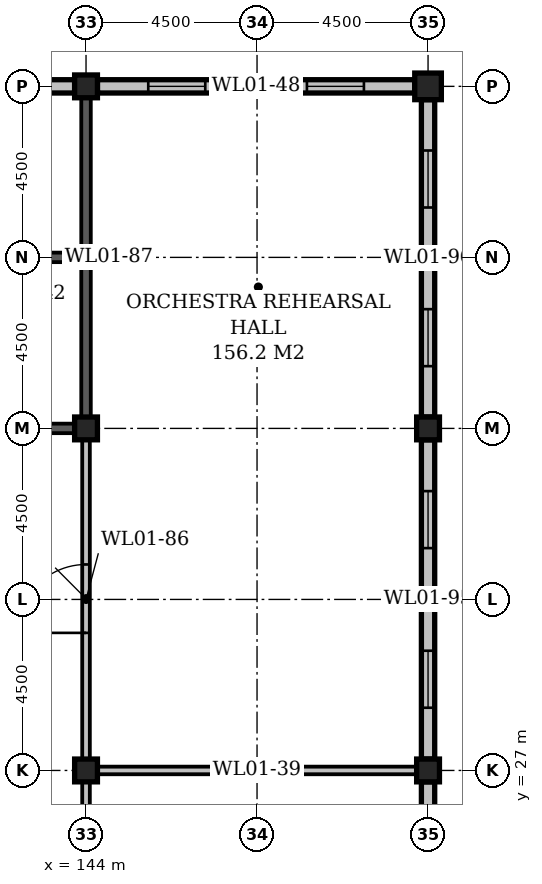
"""IFC4 building model, lengths in metres.
Left out: names, types, materials, properties, quantities, classifications, styles, units other than length and angle.
Written with IfcOpenShell. Run it as: python <this file> out.ifc"""

import sys

from ifc_helpers import new_model, si_unit, direction, frame, frame_2d, origin, origin_2d, place, context, subcontext, project, spatial, rectangle, extrude, element, fill, save


model = new_model("IFC4")
c1 = context("Model", 3, precision=1e-05, world=origin(), true_north=direction((0.0, 1.0)))
c2 = subcontext(c1, "Body", "Model", "MODEL_VIEW")
j1 = project(units=[si_unit("LENGTHUNIT", "METRE"), si_unit("PLANEANGLEUNIT", "RADIAN")], contexts=[c1])
p1 = place(None, origin())
s1 = spatial("IfcSite", under=j1, at=p1, CompositionType="ELEMENT")
p2 = place(p1, origin())
s2 = spatial("IfcBuilding", under=s1, at=p2, CompositionType="ELEMENT")
p3 = place(p2, frame((0.0, 0.0, 9.0)))
s3 = spatial("IfcBuildingStorey", under=s2, at=p3, CompositionType="ELEMENT", Elevation=9.0)
for number, where, z_axis, x_axis in (
    (1, (144.0, 27.0, 0.0), (0.0, 0.0, 1.0), (1.0, 0.0, 0.0)),
    (2, (144.0, 36.0, 0.0), (0.0, 0.0, 1.0), (1.0, 0.0, 0.0)),
    (3, (144.0, 45.0, 0.0), (0.0, 0.0, 1.0), (1.0, 0.0, 0.0)),
    (4, (153.0, 27.0, 0.0), (0.0, 0.0, 1.0), (1.0, 0.0, 0.0)),
    (5, (153.0, 36.0, 0.0), (0.0, 0.0, 1.0), (1.0, 0.0, 0.0)),
):
    element("IfcColumn", number, at=place(p3, frame(where, z_axis=z_axis, x_axis=x_axis)), inside=s3, PredefinedType="COLUMN", context=c2, shape_type="SweptSolid", body=[
        extrude(rectangle(XDim=0.6, YDim=0.6, at=origin_2d()), origin(), (0.0, 0.0, 1.0), 4.7),
    ])
p4 = place(p3, frame((153.0, 45.0, 0.0), z_axis=(0.0, 0.0, 1.0), x_axis=(1.0, 0.0, 0.0)))
e6 = element("IfcColumn", 6, at=p4, inside=s3, PredefinedType="COLUMN", context=c2, shape_type="SweptSolid", body=[
    extrude(rectangle(XDim=0.7, YDim=0.7, at=origin_2d()), origin(), (0.0, 0.0, 1.0), 4.7),
])
p5 = place(p3, frame((144.3, 27.0, 0.0), z_axis=(0.0, 0.0, 1.0), x_axis=(1.0, 0.0, 0.0)))
e7 = element("IfcWall", 7, at=p5, inside=s3, PredefinedType="STANDARD", context=c2, shape_type="SweptSolid", body=[
    extrude(rectangle(XDim=8.4, YDim=0.2, at=frame_2d((4.2, 0.0))), origin(), (0.0, 0.0, 1.0), 4.7),
])
p6 = place(p3, frame((139.5, 36.0, 0.0), z_axis=(0.0, 0.0, 1.0), x_axis=(1.0, 0.0, 0.0)))
e8 = element("IfcWall", 8, at=p6, inside=s3, PredefinedType="STANDARD", context=c2, shape_type="SweptSolid", body=[
    extrude(rectangle(XDim=4.2, YDim=0.25, at=frame_2d((2.1, 0.0))), origin(), (0.0, 0.0, 1.0), 4.7),
])
p7 = place(p6, frame((1.57, 0.0, 0.0)))
e9 = element("IfcOpeningElement", 9, at=p7, cuts=e8, PredefinedType="OPENING", context=c2, shape_type="SweptSolid", body=[
    extrude(rectangle(XDim=1.4, YDim=2.1, at=frame_2d((0.7, 1.05))), frame((0.0, 0.137, 0.0), z_axis=(0.0, -1.0, 0.0), x_axis=(1.0, 0.0, 0.0)), (0.0, 0.0, 1.0), 0.274),
])
p8 = place(p3, frame((139.625, 40.5, 0.0), z_axis=(0.0, 0.0, 1.0), x_axis=(1.0, 0.0, 0.0)))
e10 = element("IfcWall", 10, at=p8, inside=s3, PredefinedType="STANDARD", context=c2, shape_type="SweptSolid", body=[
    extrude(rectangle(XDim=4.25, YDim=0.25, at=frame_2d((2.125, 0.0))), origin(), (0.0, 0.0, 1.0), 4.7),
])
p9 = place(p8, frame((1.42, 0.0, 0.0)))
e11 = element("IfcOpeningElement", 11, at=p9, cuts=e10, PredefinedType="OPENING", context=c2, shape_type="SweptSolid", body=[
    extrude(rectangle(XDim=1.4, YDim=2.1, at=frame_2d((0.7, 1.05))), frame((0.0, 0.137, 0.0), z_axis=(0.0, -1.0, 0.0), x_axis=(1.0, 0.0, 0.0)), (0.0, 0.0, 1.0), 0.274),
])
p10 = place(p3, frame((139.5, 45.0, 0.0), z_axis=(0.0, 0.0, 1.0), x_axis=(1.0, 0.0, 0.0)))
e12 = element("IfcWall", 12, at=p10, inside=s3, PredefinedType="STANDARD", context=c2, shape_type="SweptSolid", body=[
    extrude(rectangle(XDim=4.2, YDim=0.35, at=frame_2d((2.1, 0.0))), origin(), (0.0, 0.0, 1.0), 4.1),
])
p11 = place(p3, frame((144.3, 45.0, 0.0), z_axis=(0.0, 0.0, 1.0), x_axis=(1.0, 0.0, 0.0)))
e13 = element("IfcWall", 13, at=p11, inside=s3, PredefinedType="STANDARD", context=c2, shape_type="SweptSolid", body=[
    extrude(rectangle(XDim=8.35, YDim=0.35, at=frame_2d((4.175, 0.0))), origin(), (0.0, 0.0, 1.0), 4.1),
])
p12 = place(p11, frame((1.337, 0.0, 1.0)))
e14 = element("IfcOpeningElement", 14, at=p12, cuts=e13, PredefinedType="OPENING", context=c2, shape_type="SweptSolid", body=[
    extrude(rectangle(XDim=1.5, YDim=2.4, at=frame_2d((0.75, 1.2))), frame((0.0, 0.187, 0.0), z_axis=(0.0, -1.0, 0.0), x_axis=(1.0, 0.0, 0.0)), (0.0, 0.0, 1.0), 0.374),
])
p13 = place(p11, frame((5.512, 0.0, 1.0)))
e15 = element("IfcOpeningElement", 15, at=p13, cuts=e13, PredefinedType="OPENING", context=c2, shape_type="SweptSolid", body=[
    extrude(rectangle(XDim=1.5, YDim=2.4, at=frame_2d((0.75, 1.2))), frame((0.0, 0.187, 0.0), z_axis=(0.0, -1.0, 0.0), x_axis=(1.0, 0.0, 0.0)), (0.0, 0.0, 1.0), 0.374),
])
p14 = place(p3, frame((144.0, 18.3, 0.0), z_axis=(0.0, 0.0, 1.0), x_axis=(0.0, 1.0, 0.0)))
e16 = element("IfcWall", 16, at=p14, inside=s3, PredefinedType="STANDARD", context=c2, shape_type="SweptSolid", body=[
    extrude(rectangle(XDim=8.4, YDim=0.2, at=frame_2d((4.2, 0.0))), origin(), (0.0, 0.0, 1.0), 4.7),
])
p15 = place(p14, frame((2.97, 0.0, 0.0)))
e17 = element("IfcOpeningElement", 17, at=p15, cuts=e16, PredefinedType="OPENING", context=c2, shape_type="SweptSolid", body=[
    extrude(rectangle(XDim=1.0, YDim=2.1, at=frame_2d((0.5, 1.05))), frame((0.0, 0.112, 0.0), z_axis=(0.0, -1.0, 0.0), x_axis=(1.0, 0.0, 0.0)), (0.0, 0.0, 1.0), 0.224),
])
p16 = place(p3, frame((144.0, 27.3, 0.0), z_axis=(0.0, 0.0, 1.0), x_axis=(0.0, 1.0, 0.0)))
e18 = element("IfcWall", 18, at=p16, inside=s3, PredefinedType="STANDARD", context=c2, shape_type="SweptSolid", body=[
    extrude(rectangle(XDim=8.4, YDim=0.2, at=frame_2d((4.2, 0.0))), origin(), (0.0, 0.0, 1.0), 4.7),
])
p17 = place(p16, frame((3.32, 0.0, 0.0)))
e19 = element("IfcOpeningElement", 19, at=p17, cuts=e18, PredefinedType="OPENING", context=c2, shape_type="SweptSolid", body=[
    extrude(rectangle(XDim=1.8, YDim=2.4, at=frame_2d((0.9, 1.2))), frame((0.0, 0.112, 0.0), z_axis=(0.0, -1.0, 0.0), x_axis=(1.0, 0.0, 0.0)), (0.0, 0.0, 1.0), 0.224),
])
p18 = place(p3, frame((144.0, 36.3, 0.0), z_axis=(0.0, 0.0, 1.0), x_axis=(0.0, 1.0, 0.0)))
e20 = element("IfcWall", 20, at=p18, inside=s3, PredefinedType="STANDARD", context=c2, shape_type="SweptSolid", body=[
    extrude(rectangle(XDim=8.4, YDim=0.25, at=frame_2d((4.2, 0.0))), origin(), (0.0, 0.0, 1.0), 4.7),
])
p19 = place(p3, frame((153.0, 18.3, 0.0), z_axis=(0.0, 0.0, 1.0), x_axis=(0.0, 1.0, 0.0)))
e21 = element("IfcWall", 21, at=p19, inside=s3, PredefinedType="STANDARD", context=c2, shape_type="SweptSolid", body=[
    extrude(rectangle(XDim=8.4, YDim=0.35, at=frame_2d((4.2, 0.0))), origin(), (0.0, 0.0, 1.0), 4.1),
])
p20 = place(p19, frame((1.35, 0.0, 1.0)))
e22 = element("IfcOpeningElement", 22, at=p20, cuts=e21, PredefinedType="OPENING", context=c2, shape_type="SweptSolid", body=[
    extrude(rectangle(XDim=1.5, YDim=2.4, at=frame_2d((0.75, 1.2))), frame((0.0, 0.187, 0.0), z_axis=(0.0, -1.0, 0.0), x_axis=(1.0, 0.0, 0.0)), (0.0, 0.0, 1.0), 0.374),
])
p21 = place(p19, frame((5.55, 0.0, 1.0)))
e23 = element("IfcOpeningElement", 23, at=p21, cuts=e21, PredefinedType="OPENING", context=c2, shape_type="SweptSolid", body=[
    extrude(rectangle(XDim=1.5, YDim=2.4, at=frame_2d((0.75, 1.2))), frame((0.0, 0.187, 0.0), z_axis=(0.0, -1.0, 0.0), x_axis=(1.0, 0.0, 0.0)), (0.0, 0.0, 1.0), 0.374),
])
p22 = place(p3, frame((153.0, 27.3, 0.0), z_axis=(0.0, 0.0, 1.0), x_axis=(0.0, 1.0, 0.0)))
e24 = element("IfcWall", 24, at=p22, inside=s3, PredefinedType="STANDARD", context=c2, shape_type="SweptSolid", body=[
    extrude(rectangle(XDim=8.4, YDim=0.35, at=frame_2d((4.2, 0.0))), origin(), (0.0, 0.0, 1.0), 4.1),
])
p23 = place(p22, frame((1.35, 0.0, 1.0)))
e25 = element("IfcOpeningElement", 25, at=p23, cuts=e24, PredefinedType="OPENING", context=c2, shape_type="SweptSolid", body=[
    extrude(rectangle(XDim=1.5, YDim=2.4, at=frame_2d((0.75, 1.2))), frame((0.0, 0.187, 0.0), z_axis=(0.0, -1.0, 0.0), x_axis=(1.0, 0.0, 0.0)), (0.0, 0.0, 1.0), 0.374),
])
p24 = place(p22, frame((5.55, 0.0, 1.0)))
e26 = element("IfcOpeningElement", 26, at=p24, cuts=e24, PredefinedType="OPENING", context=c2, shape_type="SweptSolid", body=[
    extrude(rectangle(XDim=1.5, YDim=2.4, at=frame_2d((0.75, 1.2))), frame((0.0, 0.187, 0.0), z_axis=(0.0, -1.0, 0.0), x_axis=(1.0, 0.0, 0.0)), (0.0, 0.0, 1.0), 0.374),
])
p25 = place(p3, frame((153.0, 36.3, 0.0), z_axis=(0.0, 0.0, 1.0), x_axis=(0.0, 1.0, 0.0)))
e27 = element("IfcWall", 27, at=p25, inside=s3, PredefinedType="STANDARD", context=c2, shape_type="SweptSolid", body=[
    extrude(rectangle(XDim=8.35, YDim=0.35, at=frame_2d((4.175, 0.0))), origin(), (0.0, 0.0, 1.0), 4.1),
])
p26 = place(p25, frame((1.337, 0.0, 1.0)))
e28 = element("IfcOpeningElement", 28, at=p26, cuts=e27, PredefinedType="OPENING", context=c2, shape_type="SweptSolid", body=[
    extrude(rectangle(XDim=1.5, YDim=2.4, at=frame_2d((0.75, 1.2))), frame((0.0, 0.187, 0.0), z_axis=(0.0, -1.0, 0.0), x_axis=(1.0, 0.0, 0.0)), (0.0, 0.0, 1.0), 0.374),
])
p27 = place(p25, frame((5.512, 0.0, 1.0)))
e29 = element("IfcOpeningElement", 29, at=p27, cuts=e27, PredefinedType="OPENING", context=c2, shape_type="SweptSolid", body=[
    extrude(rectangle(XDim=1.5, YDim=2.4, at=frame_2d((0.75, 1.2))), frame((0.0, 0.187, 0.0), z_axis=(0.0, -1.0, 0.0), x_axis=(1.0, 0.0, 0.0)), (0.0, 0.0, 1.0), 0.374),
])
p28 = place(p17, origin())
e30 = element("IfcDoor", 30, at=p28, inside=s3, OperationType="DOUBLE_DOOR_SINGLE_SWING", PredefinedType="DOOR", context=c2, shape_type="SweptSolid", body=[
    extrude(rectangle(XDim=1.8, YDim=2.4, at=frame_2d((0.9, 1.2))), frame((0.0, 0.025, 0.0), z_axis=(0.0, -1.0, 0.0), x_axis=(1.0, 0.0, 0.0)), (0.0, 0.0, 1.0), 0.05),
])
fill(e19, e30)
p29 = place(p12, origin())
e31 = element("IfcWindow", 31, at=p29, inside=s3, PartitioningType="SINGLE_PANEL", PredefinedType="WINDOW", context=c2, shape_type="SweptSolid", body=[
    extrude(rectangle(XDim=1.5, YDim=2.4, at=frame_2d((0.75, 1.2))), frame((0.0, 0.03, 0.0), z_axis=(0.0, -1.0, 0.0), x_axis=(1.0, 0.0, 0.0)), (0.0, 0.0, 1.0), 0.06),
])
fill(e14, e31)
p30 = place(p13, origin())
e32 = element("IfcWindow", 32, at=p30, inside=s3, PartitioningType="SINGLE_PANEL", PredefinedType="WINDOW", context=c2, shape_type="SweptSolid", body=[
    extrude(rectangle(XDim=1.5, YDim=2.4, at=frame_2d((0.75, 1.2))), frame((0.0, 0.03, 0.0), z_axis=(0.0, -1.0, 0.0), x_axis=(1.0, 0.0, 0.0)), (0.0, 0.0, 1.0), 0.06),
])
fill(e15, e32)
p31 = place(p23, origin())
e33 = element("IfcWindow", 33, at=p31, inside=s3, PartitioningType="SINGLE_PANEL", PredefinedType="WINDOW", context=c2, shape_type="SweptSolid", body=[
    extrude(rectangle(XDim=1.5, YDim=2.4, at=frame_2d((0.75, 1.2))), frame((0.0, 0.03, 0.0), z_axis=(0.0, -1.0, 0.0), x_axis=(1.0, 0.0, 0.0)), (0.0, 0.0, 1.0), 0.06),
])
fill(e25, e33)
p32 = place(p24, origin())
e34 = element("IfcWindow", 34, at=p32, inside=s3, PartitioningType="SINGLE_PANEL", PredefinedType="WINDOW", context=c2, shape_type="SweptSolid", body=[
    extrude(rectangle(XDim=1.5, YDim=2.4, at=frame_2d((0.75, 1.2))), frame((0.0, 0.03, 0.0), z_axis=(0.0, -1.0, 0.0), x_axis=(1.0, 0.0, 0.0)), (0.0, 0.0, 1.0), 0.06),
])
fill(e26, e34)
p33 = place(p26, origin())
e35 = element("IfcWindow", 35, at=p33, inside=s3, PartitioningType="SINGLE_PANEL", PredefinedType="WINDOW", context=c2, shape_type="SweptSolid", body=[
    extrude(rectangle(XDim=1.5, YDim=2.4, at=frame_2d((0.75, 1.2))), frame((0.0, 0.03, 0.0), z_axis=(0.0, -1.0, 0.0), x_axis=(1.0, 0.0, 0.0)), (0.0, 0.0, 1.0), 0.06),
])
fill(e28, e35)
p34 = place(p27, origin())
e36 = element("IfcWindow", 36, at=p34, inside=s3, PartitioningType="SINGLE_PANEL", PredefinedType="WINDOW", context=c2, shape_type="SweptSolid", body=[
    extrude(rectangle(XDim=1.5, YDim=2.4, at=frame_2d((0.75, 1.2))), frame((0.0, 0.03, 0.0), z_axis=(0.0, -1.0, 0.0), x_axis=(1.0, 0.0, 0.0)), (0.0, 0.0, 1.0), 0.06),
])
fill(e29, e36)
save(model, sys.argv[1])
